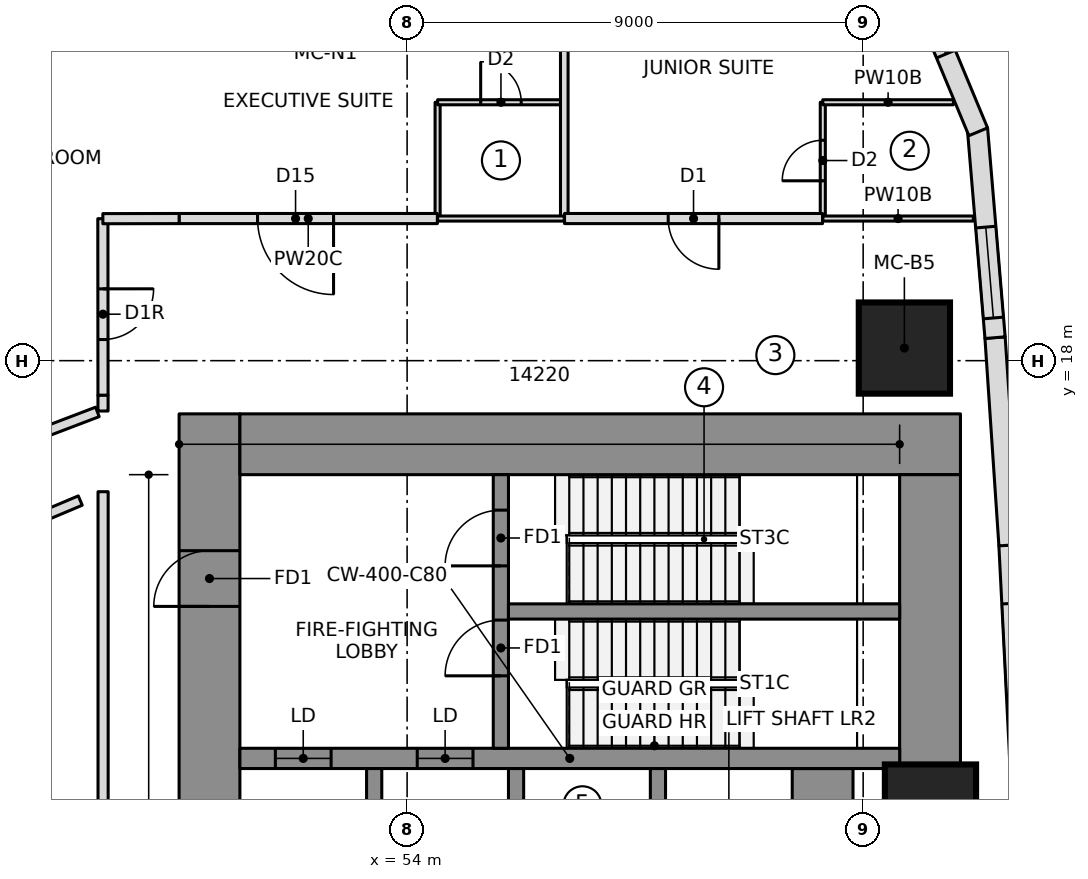
"""IFC4 building model, lengths in metres.
Left out: names, types, materials, properties, quantities, classifications, styles, units other than length and angle.
Written with IfcOpenShell. Run it as: python <this file> out.ifc"""

import sys

from ifc_helpers import new_model, si_unit, direction, frame, frame_2d, origin, origin_2d, place, context, subcontext, project, spatial, polyline, rectangle, outline, extrude, element, fill, save


model = new_model("IFC4")
c1 = context("Model", 3, precision=1e-05, world=origin(), true_north=direction((0.0, 1.0)))
c2 = subcontext(c1, "Body", "Model", "MODEL_VIEW")
j1 = project(units=[si_unit("LENGTHUNIT", "METRE"), si_unit("PLANEANGLEUNIT", "RADIAN")], contexts=[c1])
p1 = place(None, origin())
s1 = spatial("IfcSite", under=j1, at=p1, CompositionType="ELEMENT")
p2 = place(p1, origin())
s2 = spatial("IfcBuilding", under=s1, at=p2, CompositionType="ELEMENT")
p3 = place(p2, frame((0.0, 0.0, 35.0)))
s3 = spatial("IfcBuildingStorey", under=s2, at=p3, CompositionType="ELEMENT", Elevation=35.0)
p4 = place(p3, frame((50.1, 6.65, 0.0), z_axis=(0.0, 0.0, 1.0), x_axis=(0.0, 1.0, 0.0)))
e1 = element("IfcWall", 1, at=p4, inside=s3, PredefinedType="SHEAR", context=c2, shape_type="SweptSolid", body=[
    extrude(rectangle(XDim=10.3, YDim=1.2, at=frame_2d((5.15, 0.0))), origin(), (0.0, 0.0, 1.0), 4.6),
])
p5 = place(p4, frame((6.5, 0.0, 0.0)))
e2 = element("IfcOpeningElement", 2, at=p5, cuts=e1, PredefinedType="OPENING", context=c2, shape_type="SweptSolid", body=[
    extrude(rectangle(XDim=1.1, YDim=2.1, at=frame_2d((0.55, 1.05))), frame((0.0, 0.61, 0.0), z_axis=(0.0, -1.0, 0.0), x_axis=(1.0, 0.0, 0.0)), (0.0, 0.0, 1.0), 1.22),
])
p6 = place(p3, frame((50.7, 16.35, 0.0), z_axis=(0.0, 0.0, 1.0), x_axis=(1.0, 0.0, 0.0)))
e3 = element("IfcWall", 3, at=p6, inside=s3, PredefinedType="SHEAR", context=c2, shape_type="SweptSolid", body=[
    extrude(rectangle(XDim=14.22, YDim=1.2, at=frame_2d((7.11, 0.0))), origin(), (0.0, 0.0, 1.0), 4.6),
])
p7 = place(p3, frame((64.32, 9.95, 0.0), z_axis=(0.0, 0.0, 1.0), x_axis=(0.0, 1.0, 0.0)))
e4 = element("IfcWall", 4, at=p7, inside=s3, PredefinedType="SHEAR", context=c2, shape_type="SweptSolid", body=[
    extrude(rectangle(XDim=5.8, YDim=1.2, at=frame_2d((2.9, 0.0))), origin(), (0.0, 0.0, 1.0), 4.6),
])
p8 = place(p3, frame((62.2, -9.95, 0.0), z_axis=(0.0, 0.0, 1.0), x_axis=(0.0, 1.0, 0.0)))
e5 = element("IfcWall", 5, at=p8, inside=s3, PredefinedType="SHEAR", context=c2, shape_type="SweptSolid", body=[
    extrude(rectangle(XDim=19.9, YDim=1.2, at=frame_2d((9.95, 0.0))), origin(), (0.0, 0.0, 1.0), 4.6),
])
p9 = place(p3, frame((50.7, 10.15, 0.0), z_axis=(0.0, 0.0, 1.0), x_axis=(1.0, 0.0, 0.0)))
e6 = element("IfcWall", 6, at=p9, inside=s3, PredefinedType="SHEAR", context=c2, shape_type="SweptSolid", body=[
    extrude(rectangle(XDim=13.02, YDim=0.4, at=frame_2d((6.51, 0.0))), origin(), (0.0, 0.0, 1.0), 4.6),
])
p10 = place(p9, frame((0.7, 0.0, 0.0)))
e7 = element("IfcOpeningElement", 7, at=p10, cuts=e6, PredefinedType="OPENING", context=c2, shape_type="SweptSolid", body=[
    extrude(rectangle(XDim=1.1, YDim=2.1, at=frame_2d((0.55, 1.05))), frame((0.0, 0.21, 0.0), z_axis=(0.0, -1.0, 0.0), x_axis=(1.0, 0.0, 0.0)), (0.0, 0.0, 1.0), 0.42),
])
p11 = place(p9, frame((3.5, 0.0, 0.0)))
e8 = element("IfcOpeningElement", 8, at=p11, cuts=e6, PredefinedType="OPENING", context=c2, shape_type="SweptSolid", body=[
    extrude(rectangle(XDim=1.1, YDim=2.1, at=frame_2d((0.55, 1.05))), frame((0.0, 0.21, 0.0), z_axis=(0.0, -1.0, 0.0), x_axis=(1.0, 0.0, 0.0)), (0.0, 0.0, 1.0), 0.42),
])
for number, where, z_axis, x_axis in (
    (9, (53.35, 6.95, 0.0), (0.0, 0.0, 1.0), (0.0, 1.0, 0.0)),
    (10, (56.15, 6.95, 0.0), (0.0, 0.0, 1.0), (0.0, 1.0, 0.0)),
    (11, (58.95, 6.95, 0.0), (0.0, 0.0, 1.0), (0.0, 1.0, 0.0)),
):
    element("IfcWall", number, at=place(p3, frame(where, z_axis=z_axis, x_axis=x_axis)), inside=s3, PredefinedType="SHEAR", context=c2, shape_type="SweptSolid", body=[
        extrude(rectangle(XDim=3.0, YDim=0.3, at=frame_2d((1.5, 0.0))), origin(), (0.0, 0.0, 1.0), 4.6),
    ])
p12 = place(p3, frame((55.85, 10.35, 0.0), z_axis=(0.0, 0.0, 1.0), x_axis=(0.0, 1.0, 0.0)))
e12 = element("IfcWall", 12, at=p12, inside=s3, PredefinedType="SHEAR", context=c2, shape_type="SweptSolid", body=[
    extrude(rectangle(XDim=5.4, YDim=0.3, at=frame_2d((2.7, 0.0))), origin(), (0.0, 0.0, 1.0), 4.6),
])
p13 = place(p12, frame((1.43, 0.0, 0.0)))
e13 = element("IfcOpeningElement", 13, at=p13, cuts=e12, PredefinedType="OPENING", context=c2, shape_type="SweptSolid", body=[
    extrude(rectangle(XDim=1.1, YDim=2.1, at=frame_2d((0.55, 1.05))), frame((0.0, 0.16, 0.0), z_axis=(0.0, -1.0, 0.0), x_axis=(1.0, 0.0, 0.0)), (0.0, 0.0, 1.0), 0.32),
])
p14 = place(p12, frame((3.6, 0.0, 0.0)))
e14 = element("IfcOpeningElement", 14, at=p14, cuts=e12, PredefinedType="OPENING", context=c2, shape_type="SweptSolid", body=[
    extrude(rectangle(XDim=1.1, YDim=2.1, at=frame_2d((0.55, 1.05))), frame((0.0, 0.16, 0.0), z_axis=(0.0, -1.0, 0.0), x_axis=(1.0, 0.0, 0.0)), (0.0, 0.0, 1.0), 0.32),
])
p15 = place(p3, frame((56.0, 13.05, 0.0), z_axis=(0.0, 0.0, 1.0), x_axis=(1.0, 0.0, 0.0)))
e15 = element("IfcWall", 15, at=p15, inside=s3, PredefinedType="SHEAR", context=c2, shape_type="SweptSolid", body=[
    extrude(rectangle(XDim=7.72, YDim=0.3, at=frame_2d((3.86, 0.0))), origin(), (0.0, 0.0, 1.0), 4.6),
])
for number, where, z_axis, x_axis in (
    (16, (64.328, 9.131, 0.0), (0.0, 0.0, 1.0), (1.0, 0.0, 0.0)),
    (17, (63.813, 18.249, 0.0), (0.0, 0.0, 1.0), (1.0, 0.0, 0.0)),
):
    element("IfcColumn", number, at=place(p3, frame(where, z_axis=z_axis, x_axis=x_axis)), inside=s3, PredefinedType="COLUMN", context=c2, shape_type="SweptSolid", body=[
        extrude(rectangle(XDim=1.8, YDim=1.8, at=origin_2d()), origin(), (0.0, 0.0, 1.0), 4.6),
    ])
p16 = place(p3, frame((66.085, 10.26, 0.0), z_axis=(0.0, 0.0, 1.0), x_axis=(-0.050314326423, 0.998733432181, 0.0)))
e18 = element("IfcWall", 18, at=p16, inside=s3, PredefinedType="NOTDEFINED", context=c2, shape_type="SweptSolid", body=[
    extrude(outline(polyline([(-0.002, -0.2), (4.107, -0.2), (4.103, 0.2), (0.002, 0.2), (-0.002, -0.2)])), origin(), (0.0, 0.0, 1.0), 4.3),
])
p17 = place(p16, frame((1.153, 0.0, 1.8)))
e19 = element("IfcOpeningElement", 19, at=p17, cuts=e18, PredefinedType="OPENING", context=c2, shape_type="SweptSolid", body=[
    extrude(rectangle(XDim=1.8, YDim=1.2, at=frame_2d((0.9, 0.6))), frame((0.0, 0.21, 0.0), z_axis=(0.0, -1.0, 0.0), x_axis=(1.0, 0.0, 0.0)), (0.0, 0.0, 1.0), 0.42),
])
p18 = place(p3, frame((65.878, 14.36, 0.0), z_axis=(0.0, 0.0, 1.0), x_axis=(-0.067087430225, 0.997747100575, 0.0)))
e20 = element("IfcWall", 20, at=p18, inside=s3, PredefinedType="NOTDEFINED", context=c2, shape_type="SweptSolid", body=[
    extrude(outline(polyline([(-0.002, -0.2), (4.107, -0.2), (4.103, 0.2), (0.002, 0.2), (-0.002, -0.2)])), origin(), (0.0, 0.0, 1.0), 4.3),
])
p19 = place(p3, frame((65.603, 18.455, 0.0), z_axis=(0.0, 0.0, 1.0), x_axis=(-0.083793550906, 0.996483136248, 0.0)))
e21 = element("IfcWall", 21, at=p19, inside=s3, PredefinedType="NOTDEFINED", context=c2, shape_type="SweptSolid", body=[
    extrude(outline(polyline([(-0.002, -0.2), (4.136, -0.2), (4.074, 0.2), (0.002, 0.2), (-0.002, -0.2)])), origin(), (0.0, 0.0, 1.0), 4.3),
])
p20 = place(p19, frame((0.388, 0.0, 1.8)))
e22 = element("IfcOpeningElement", 22, at=p20, cuts=e21, PredefinedType="OPENING", context=c2, shape_type="SweptSolid", body=[
    extrude(rectangle(XDim=1.8, YDim=1.2, at=frame_2d((0.9, 0.6))), frame((0.0, 0.21, 0.0), z_axis=(0.0, -1.0, 0.0), x_axis=(1.0, 0.0, 0.0)), (0.0, 0.0, 1.0), 0.42),
])
p21 = place(p3, frame((65.259, 22.546, 0.0), z_axis=(0.0, 0.0, 1.0), x_axis=(-0.384372042685, 0.923178277908, 0.0)))
e23 = element("IfcWall", 23, at=p21, inside=s3, PredefinedType="NOTDEFINED", context=c2, shape_type="SweptSolid", body=[
    extrude(outline(polyline([(-0.031, -0.2), (4.408, -0.2), (4.283, 0.2), (0.031, 0.2), (-0.031, -0.2)])), origin(), (0.0, 0.0, 1.0), 4.3),
])
p22 = place(p21, frame((1.631, 0.0, 0.6)))
e24 = element("IfcOpeningElement", 24, at=p22, cuts=e23, PredefinedType="OPENING", context=c2, shape_type="SweptSolid", body=[
    extrude(outline(polyline([(0.0, 1.35), (0.084, 1.771), (0.322, 2.128), (0.679, 2.366), (1.1, 2.45), (1.521, 2.366), (1.878, 2.128), (2.116, 1.771), (2.2, 1.35), (2.2, 1.1), (2.116, 0.679), (1.878, 0.322), (1.521, 0.084), (1.1, 0.0), (0.679, 0.084), (0.322, 0.322), (0.084, 0.679), (0.0, 1.1), (0.0, 1.35)])), frame((0.0, 0.21, 0.0), z_axis=(0.0, -1.0, 0.0), x_axis=(1.0, 0.0, 0.0)), (0.0, 0.0, 1.0), 0.42),
])
p23 = place(p3, frame((54.602, 20.8, 0.0), z_axis=(0.0, 0.0, 1.0), x_axis=(0.0, 1.0, 0.0)))
e25 = element("IfcWall", 25, at=p23, inside=s3, PredefinedType="PARTITIONING", context=c2, shape_type="SweptSolid", body=[
    extrude(rectangle(XDim=2.3, YDim=0.1, at=frame_2d((1.15, 0.0))), origin(), (0.0, 0.0, 1.0), 4.3),
])
p24 = place(p3, frame((54.602, 23.1, 0.0), z_axis=(0.0, 0.0, 1.0), x_axis=(1.0, 0.0, 0.0)))
e26 = element("IfcWall", 26, at=p24, inside=s3, PredefinedType="PARTITIONING", context=c2, shape_type="SweptSolid", body=[
    extrude(rectangle(XDim=2.5, YDim=0.1, at=frame_2d((1.25, 0.0))), origin(), (0.0, 0.0, 1.0), 4.3),
])
p25 = place(p24, frame((0.85, 0.0, 0.0)))
e27 = element("IfcOpeningElement", 27, at=p25, cuts=e26, PredefinedType="OPENING", context=c2, shape_type="SweptSolid", body=[
    extrude(rectangle(XDim=0.8, YDim=2.1, at=frame_2d((0.4, 1.05))), frame((0.0, 0.06, 0.0), z_axis=(0.0, -1.0, 0.0), x_axis=(1.0, 0.0, 0.0)), (0.0, 0.0, 1.0), 0.12),
])
p26 = place(p3, frame((62.203, 20.8, 0.0), z_axis=(0.0, 0.0, 1.0), x_axis=(0.0, 1.0, 0.0)))
e28 = element("IfcWall", 28, at=p26, inside=s3, PredefinedType="PARTITIONING", context=c2, shape_type="SweptSolid", body=[
    extrude(rectangle(XDim=2.3, YDim=0.1, at=frame_2d((1.15, 0.0))), origin(), (0.0, 0.0, 1.0), 4.3),
])
p27 = place(p26, frame((0.75, 0.0, 0.0)))
e29 = element("IfcOpeningElement", 29, at=p27, cuts=e28, PredefinedType="OPENING", context=c2, shape_type="SweptSolid", body=[
    extrude(rectangle(XDim=0.8, YDim=2.1, at=frame_2d((0.4, 1.05))), frame((0.0, 0.06, 0.0), z_axis=(0.0, -1.0, 0.0), x_axis=(1.0, 0.0, 0.0)), (0.0, 0.0, 1.0), 0.12),
])
p28 = place(p3, frame((62.203, 23.1, 0.0), z_axis=(0.0, 0.0, 1.0), x_axis=(1.0, 0.0, 0.0)))
e30 = element("IfcWall", 30, at=p28, inside=s3, PredefinedType="PARTITIONING", context=c2, shape_type="SweptSolid", body=[
    extrude(rectangle(XDim=2.578, YDim=0.1, at=frame_2d((1.289, 0.0))), origin(), (0.0, 0.0, 1.0), 4.3),
])
p29 = place(p3, frame((57.102, 20.8, 0.0), z_axis=(0.0, 0.0, 1.0), x_axis=(0.0, 1.0, 0.0)))
e31 = element("IfcWall", 31, at=p29, inside=s3, PredefinedType="PARTITIONING", context=c2, shape_type="SweptSolid", body=[
    extrude(rectangle(XDim=7.787, YDim=0.15, at=frame_2d((3.894, 0.0))), origin(), (0.0, 0.0, 1.0), 4.3),
])
p30 = place(p3, frame((44.348, 13.887, 0.0), z_axis=(0.0, 0.0, 1.0), x_axis=(0.921260748386, 0.388945540512, 0.0)))
e32 = element("IfcWall", 32, at=p30, inside=s3, PredefinedType="PARTITIONING", context=c2, shape_type="SweptSolid", body=[
    extrude(rectangle(XDim=3.476, YDim=0.2, at=frame_2d((1.738, 0.0))), origin(), (0.0, 0.0, 1.0), 4.3),
])
p31 = place(p3, frame((54.597, 20.805, 0.0), z_axis=(0.0, 0.0, 1.0), x_axis=(-1.0, 0.0, 0.0)))
e33 = element("IfcWall", 33, at=p31, inside=s3, PredefinedType="PARTITIONING", context=c2, shape_type="SweptSolid", body=[
    extrude(rectangle(XDim=5.097, YDim=0.2, at=frame_2d((2.548, 0.0))), origin(), (0.0, 0.0, 1.0), 4.3),
])
p32 = place(p31, frame((2.048, 0.0, 0.0)))
e34 = element("IfcOpeningElement", 34, at=p32, cuts=e33, PredefinedType="OPENING", context=c2, shape_type="SweptSolid", body=[
    extrude(rectangle(XDim=1.5, YDim=2.1, at=frame_2d((0.75, 1.05))), frame((0.0, 0.11, 0.0), z_axis=(0.0, -1.0, 0.0), x_axis=(1.0, 0.0, 0.0)), (0.0, 0.0, 1.0), 0.22),
])
p33 = place(p3, frame((62.198, 20.805, 0.0), z_axis=(0.0, 0.0, 1.0), x_axis=(-1.0, 0.0, 0.0)))
e35 = element("IfcWall", 35, at=p33, inside=s3, PredefinedType="PARTITIONING", context=c2, shape_type="SweptSolid", body=[
    extrude(rectangle(XDim=5.092, YDim=0.2, at=frame_2d((2.546, 0.0))), origin(), (0.0, 0.0, 1.0), 4.3),
])
p34 = place(p33, frame((2.046, 0.0, 0.0)))
e36 = element("IfcOpeningElement", 36, at=p34, cuts=e35, PredefinedType="OPENING", context=c2, shape_type="SweptSolid", body=[
    extrude(rectangle(XDim=1.0, YDim=2.1, at=frame_2d((0.5, 1.05))), frame((0.0, 0.11, 0.0), z_axis=(0.0, -1.0, 0.0), x_axis=(1.0, 0.0, 0.0)), (0.0, 0.0, 1.0), 0.22),
])
p35 = place(p3, frame((57.102, 20.805, 0.0), z_axis=(0.0, 0.0, 1.0), x_axis=(-1.0, 0.0, 0.0)))
e37 = element("IfcWall", 37, at=p35, inside=s3, PredefinedType="PARTITIONING", context=c2, shape_type="SweptSolid", body=[
    extrude(rectangle(XDim=2.5, YDim=0.1, at=frame_2d((1.25, 0.0))), origin(), (0.0, 0.0, 1.0), 4.3),
])
p36 = place(p3, frame((65.175, 20.805, 0.0), z_axis=(0.0, 0.0, 1.0), x_axis=(-1.0, 0.0, 0.0)))
e38 = element("IfcWall", 38, at=p36, inside=s3, PredefinedType="PARTITIONING", context=c2, shape_type="SweptSolid", body=[
    extrude(rectangle(XDim=2.971, YDim=0.1, at=frame_2d((1.486, 0.0))), origin(), (0.0, 0.0, 1.0), 4.3),
])
p37 = place(p3, frame((47.996, 20.802, 0.0), z_axis=(0.0, 0.0, 1.0), x_axis=(0.000840276995, -0.999999646967, 0.0)))
e39 = element("IfcWall", 39, at=p37, inside=s3, PredefinedType="PARTITIONING", context=c2, shape_type="SweptSolid", body=[
    extrude(rectangle(XDim=3.487, YDim=0.2, at=frame_2d((1.743, 0.0))), origin(), (0.0, 0.0, 1.0), 4.3),
])
p38 = place(p37, frame((1.385, 0.0, 0.0)))
e40 = element("IfcOpeningElement", 40, at=p38, cuts=e39, PredefinedType="OPENING", context=c2, shape_type="SweptSolid", body=[
    extrude(rectangle(XDim=1.0, YDim=2.1, at=frame_2d((0.5, 1.05))), frame((0.0, 0.11, 0.0), z_axis=(0.0, -1.0, 0.0), x_axis=(1.0, 0.0, 0.0)), (0.0, 0.0, 1.0), 0.22),
])
p39 = place(p3, frame((48.0, 15.414, 0.0), z_axis=(0.0, 0.0, 1.0), x_axis=(0.0, -1.0, 0.0)))
e41 = element("IfcWall", 41, at=p39, inside=s3, PredefinedType="PARTITIONING", context=c2, shape_type="SweptSolid", body=[
    extrude(rectangle(XDim=30.828, YDim=0.2, at=frame_2d((15.414, 0.0))), origin(), (0.0, 0.0, 1.0), 4.3),
])
p40 = place(p3, frame((49.5, 20.805, 0.0), z_axis=(0.0, 0.0, 1.0), x_axis=(-0.999998683182, -0.001622847587, 0.0)))
e42 = element("IfcWall", 42, at=p40, inside=s3, PredefinedType="PARTITIONING", context=c2, shape_type="SweptSolid", body=[
    extrude(rectangle(XDim=1.504, YDim=0.2, at=frame_2d((0.752, 0.0))), origin(), (0.0, 0.0, 1.0), 4.3),
])
p41 = place(p3, frame((47.999, 17.316, 0.0), z_axis=(0.0, 0.0, 1.0), x_axis=(0.000787401331, -0.99999969, 0.0)))
e43 = element("IfcWall", 43, at=p41, inside=s3, PredefinedType="PARTITIONING", context=c2, shape_type="SweptSolid", body=[
    extrude(rectangle(XDim=0.31, YDim=0.2, at=frame_2d((0.155, 0.0))), origin(), (0.0, 0.0, 1.0), 4.3),
])
p42 = place(p3, frame((47.887, 16.989, 0.0), z_axis=(0.0, 0.0, 1.0), x_axis=(-0.934484272838, -0.356004415447, 0.0)))
e44 = element("IfcWall", 44, at=p42, inside=s3, PredefinedType="PARTITIONING", context=c2, shape_type="SweptSolid", body=[
    extrude(rectangle(XDim=1.117, YDim=0.2, at=frame_2d((0.559, 0.0))), origin(), (0.0, 0.0, 1.0), 4.3),
])
p43 = place(p17, origin())
e45 = element("IfcWindow", 45, at=p43, inside=s3, PartitioningType="SINGLE_PANEL", PredefinedType="WINDOW", context=c2, shape_type="SweptSolid", body=[
    extrude(rectangle(XDim=1.8, YDim=1.2, at=frame_2d((0.9, 0.6))), frame((0.0, 0.17, 0.0), z_axis=(0.0, -1.0, 0.0), x_axis=(1.0, 0.0, 0.0)), (0.0, 0.0, 1.0), 0.06),
])
fill(e19, e45)
p44 = place(p20, origin())
e46 = element("IfcWindow", 46, at=p44, inside=s3, PartitioningType="SINGLE_PANEL", PredefinedType="WINDOW", context=c2, shape_type="SweptSolid", body=[
    extrude(rectangle(XDim=1.8, YDim=1.2, at=frame_2d((0.9, 0.6))), frame((0.0, 0.17, 0.0), z_axis=(0.0, -1.0, 0.0), x_axis=(1.0, 0.0, 0.0)), (0.0, 0.0, 1.0), 0.06),
])
fill(e22, e46)
p45 = place(p22, origin())
e47 = element("IfcWindow", 47, at=p45, inside=s3, PartitioningType="SINGLE_PANEL", PredefinedType="WINDOW", context=c2, shape_type="SweptSolid", body=[
    extrude(outline(polyline([(0.0, 1.35), (0.084, 1.771), (0.322, 2.128), (0.679, 2.366), (1.1, 2.45), (1.521, 2.366), (1.878, 2.128), (2.116, 1.771), (2.2, 1.35), (2.2, 1.1), (2.116, 0.679), (1.878, 0.322), (1.521, 0.084), (1.1, 0.0), (0.679, 0.084), (0.322, 0.322), (0.084, 0.679), (0.0, 1.1), (0.0, 1.35)])), frame((0.0, 0.17, 0.0), z_axis=(0.0, -1.0, 0.0), x_axis=(1.0, 0.0, 0.0)), (0.0, 0.0, 1.0), 0.06),
])
fill(e24, e47)
p46 = place(p25, origin())
e48 = element("IfcDoor", 48, at=p46, inside=s3, OperationType="SINGLE_SWING_LEFT", PredefinedType="DOOR", context=c2, shape_type="SweptSolid", body=[
    extrude(rectangle(XDim=0.8, YDim=2.1, at=frame_2d((0.4, 1.05))), frame((0.0, 0.025, 0.0), z_axis=(0.0, -1.0, 0.0), x_axis=(1.0, 0.0, 0.0)), (0.0, 0.0, 1.0), 0.05),
])
fill(e27, e48)
p47 = place(p27, origin())
e49 = element("IfcDoor", 49, at=p47, inside=s3, OperationType="SINGLE_SWING_LEFT", PredefinedType="DOOR", context=c2, shape_type="SweptSolid", body=[
    extrude(rectangle(XDim=0.8, YDim=2.1, at=frame_2d((0.4, 1.05))), frame((0.0, 0.025, 0.0), z_axis=(0.0, -1.0, 0.0), x_axis=(1.0, 0.0, 0.0)), (0.0, 0.0, 1.0), 0.05),
])
fill(e29, e49)
p48 = place(p32, origin())
e50 = element("IfcDoor", 50, at=p48, inside=s3, OperationType="DOUBLE_DOOR_SINGLE_SWING", PredefinedType="DOOR", context=c2, shape_type="SweptSolid", body=[
    extrude(rectangle(XDim=1.5, YDim=2.1, at=frame_2d((0.75, 1.05))), frame((0.0, 0.025, 0.0), z_axis=(0.0, -1.0, 0.0), x_axis=(1.0, 0.0, 0.0)), (0.0, 0.0, 1.0), 0.05),
])
fill(e34, e50)
p49 = place(p34, origin())
e51 = element("IfcDoor", 51, at=p49, inside=s3, OperationType="SINGLE_SWING_LEFT", PredefinedType="DOOR", context=c2, shape_type="SweptSolid", body=[
    extrude(rectangle(XDim=1.0, YDim=2.1, at=frame_2d((0.5, 1.05))), frame((0.0, 0.025, 0.0), z_axis=(0.0, -1.0, 0.0), x_axis=(1.0, 0.0, 0.0)), (0.0, 0.0, 1.0), 0.05),
])
fill(e36, e51)
p50 = place(p38, origin())
e52 = element("IfcDoor", 52, at=p50, inside=s3, OperationType="SINGLE_SWING_RIGHT", PredefinedType="DOOR", context=c2, shape_type="SweptSolid", body=[
    extrude(rectangle(XDim=1.0, YDim=2.1, at=frame_2d((0.5, 1.05))), frame((0.0, 0.025, 0.0), z_axis=(0.0, -1.0, 0.0), x_axis=(1.0, 0.0, 0.0)), (0.0, 0.0, 1.0), 0.05),
])
fill(e40, e52)
p51 = place(p10, origin())
e53 = element("IfcDoor", 53, at=p51, inside=s3, OperationType="DOUBLE_DOOR_SLIDING", PredefinedType="DOOR", context=c2, shape_type="SweptSolid", body=[
    extrude(rectangle(XDim=1.1, YDim=2.1, at=frame_2d((0.55, 1.05))), frame((0.0, 0.025, 0.0), z_axis=(0.0, -1.0, 0.0), x_axis=(1.0, 0.0, 0.0)), (0.0, 0.0, 1.0), 0.05),
])
fill(e7, e53)
p52 = place(p11, origin())
e54 = element("IfcDoor", 54, at=p52, inside=s3, OperationType="DOUBLE_DOOR_SLIDING", PredefinedType="DOOR", context=c2, shape_type="SweptSolid", body=[
    extrude(rectangle(XDim=1.1, YDim=2.1, at=frame_2d((0.55, 1.05))), frame((0.0, 0.025, 0.0), z_axis=(0.0, -1.0, 0.0), x_axis=(1.0, 0.0, 0.0)), (0.0, 0.0, 1.0), 0.05),
])
fill(e8, e54)
p53 = place(p13, origin())
e55 = element("IfcDoor", 55, at=p53, inside=s3, OperationType="SINGLE_SWING_RIGHT", PredefinedType="DOOR", context=c2, shape_type="SweptSolid", body=[
    extrude(rectangle(XDim=1.1, YDim=2.1, at=frame_2d((0.55, 1.05))), frame((0.0, 0.025, 0.0), z_axis=(0.0, -1.0, 0.0), x_axis=(1.0, 0.0, 0.0)), (0.0, 0.0, 1.0), 0.05),
])
fill(e13, e55)
p54 = place(p14, origin())
e56 = element("IfcDoor", 56, at=p54, inside=s3, OperationType="SINGLE_SWING_RIGHT", PredefinedType="DOOR", context=c2, shape_type="SweptSolid", body=[
    extrude(rectangle(XDim=1.1, YDim=2.1, at=frame_2d((0.55, 1.05))), frame((0.0, 0.025, 0.0), z_axis=(0.0, -1.0, 0.0), x_axis=(1.0, 0.0, 0.0)), (0.0, 0.0, 1.0), 0.05),
])
fill(e14, e56)
p55 = place(p5, origin())
e57 = element("IfcDoor", 57, at=p55, inside=s3, OperationType="SINGLE_SWING_RIGHT", PredefinedType="DOOR", context=c2, shape_type="SweptSolid", body=[
    extrude(rectangle(XDim=1.1, YDim=2.1, at=frame_2d((0.55, 1.05))), frame((0.0, 0.025, 0.0), z_axis=(0.0, -1.0, 0.0), x_axis=(1.0, 0.0, 0.0)), (0.0, 0.0, 1.0), 0.05),
])
fill(e2, e57)
save(model, sys.argv[1])
